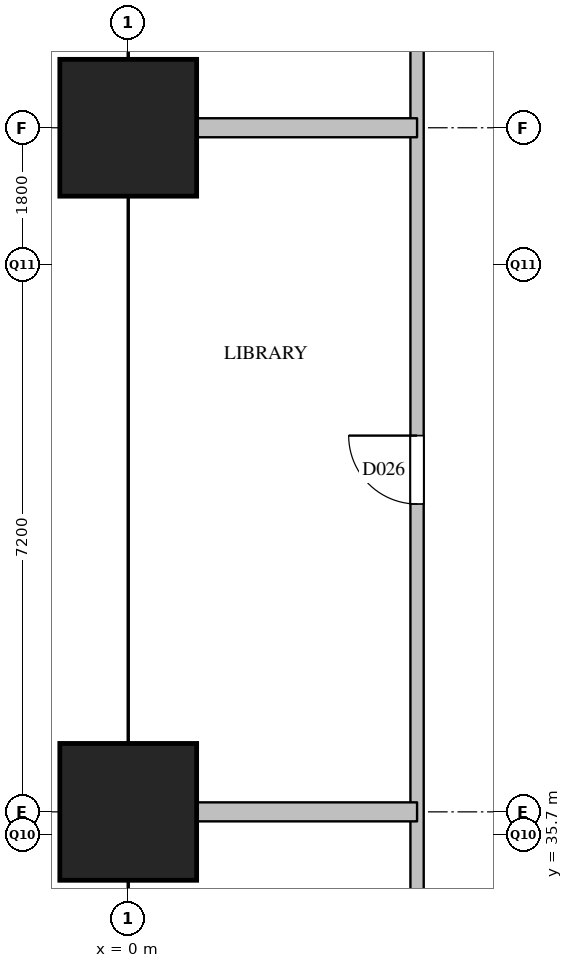
"""IFC4 building model, lengths in metres.
Left out: names, types, materials, properties, quantities, classifications, styles, units other than length and angle.
Written with IfcOpenShell. Run it as: python <this file> out.ifc"""

import sys

from ifc_helpers import new_model, si_unit, direction, frame, frame_2d, origin, origin_2d, place, context, subcontext, project, spatial, rectangle, extrude, element, fill, save


model = new_model("IFC4")
c1 = context("Model", 3, precision=1e-05, world=origin(), true_north=direction((0.0, 1.0)))
c2 = subcontext(c1, "Body", "Model", "MODEL_VIEW")
j1 = project(units=[si_unit("LENGTHUNIT", "METRE"), si_unit("PLANEANGLEUNIT", "RADIAN")], contexts=[c1])
p1 = place(None, origin())
s1 = spatial("IfcSite", under=j1, at=p1, CompositionType="ELEMENT")
p2 = place(p1, origin())
s2 = spatial("IfcBuilding", under=s1, at=p2, CompositionType="ELEMENT")
p3 = place(p2, frame((0.0, 0.0, 96.8)))
s3 = spatial("IfcBuildingStorey", under=s2, at=p3, CompositionType="ELEMENT", Elevation=96.8)
for number, where, z_axis, x_axis in (
    (1, (0.0, 36.0, 0.0), (0.0, 0.0, 1.0), (1.0, 0.0, 0.0)),
    (2, (0.0, 45.0, 0.0), (0.0, 0.0, 1.0), (1.0, 0.0, 0.0)),
):
    element("IfcColumn", number, at=place(p3, frame(where, z_axis=z_axis, x_axis=x_axis)), inside=s3, PredefinedType="COLUMN", context=c2, shape_type="SweptSolid", body=[
        extrude(rectangle(XDim=1.8, YDim=1.8, at=origin_2d()), origin(), (0.0, 0.0, 1.0), 3.8),
    ])
p4 = place(p3, frame((3.8, 28.5, 0.0), z_axis=(0.0, 0.0, 1.0), x_axis=(0.0, 1.0, 0.0)))
e3 = element("IfcWall", 3, at=p4, inside=s3, PredefinedType="PARTITIONING", context=c2, shape_type="SweptSolid", body=[
    extrude(rectangle(XDim=23.3, YDim=0.175, at=frame_2d((11.65, 0.0))), origin(), (0.0, 0.0, 1.0), 3.5),
])
p5 = place(p4, frame((3.3, 0.0, 0.0)))
e4 = element("IfcOpeningElement", 4, at=p5, cuts=e3, PredefinedType="OPENING", context=c2, shape_type="SweptSolid", body=[
    extrude(rectangle(XDim=0.9, YDim=2.1, at=frame_2d((0.45, 1.05))), frame((0.0, 0.097, 0.0), z_axis=(0.0, -1.0, 0.0), x_axis=(1.0, 0.0, 0.0)), (0.0, 0.0, 1.0), 0.195),
])
p6 = place(p4, frame((11.55, 0.0, 0.0)))
e5 = element("IfcOpeningElement", 5, at=p6, cuts=e3, PredefinedType="OPENING", context=c2, shape_type="SweptSolid", body=[
    extrude(rectangle(XDim=0.9, YDim=2.1, at=frame_2d((0.45, 1.05))), frame((0.0, 0.097, 0.0), z_axis=(0.0, -1.0, 0.0), x_axis=(1.0, 0.0, 0.0)), (0.0, 0.0, 1.0), 0.195),
])
p7 = place(p4, frame((19.45, 0.0, 0.0)))
e6 = element("IfcOpeningElement", 6, at=p7, cuts=e3, PredefinedType="OPENING", context=c2, shape_type="SweptSolid", body=[
    extrude(rectangle(XDim=0.9, YDim=2.1, at=frame_2d((0.45, 1.05))), frame((0.0, 0.097, 0.0), z_axis=(0.0, -1.0, 0.0), x_axis=(1.0, 0.0, 0.0)), (0.0, 0.0, 1.0), 0.195),
])
for number, where, z_axis, x_axis in (
    (7, (0.0, 36.0, 0.0), (0.0, 0.0, 1.0), (1.0, 0.0, 0.0)),
    (8, (0.0, 45.0, 0.0), (0.0, 0.0, 1.0), (1.0, 0.0, 0.0)),
):
    element("IfcWall", number, at=place(p3, frame(where, z_axis=z_axis, x_axis=x_axis)), inside=s3, PredefinedType="PARTITIONING", context=c2, shape_type="SweptSolid", body=[
        extrude(rectangle(XDim=3.8, YDim=0.25, at=frame_2d((1.9, 0.0))), origin(), (0.0, 0.0, 1.0), 3.5),
    ])
p8 = place(p6, origin())
e9 = element("IfcDoor", 9, at=p8, inside=s3, OperationType="SINGLE_SWING_RIGHT", PredefinedType="DOOR", context=c2, shape_type="SweptSolid", body=[
    extrude(rectangle(XDim=0.9, YDim=2.1, at=frame_2d((0.45, 1.05))), frame((0.0, 0.025, 0.0), z_axis=(0.0, -1.0, 0.0), x_axis=(1.0, 0.0, 0.0)), (0.0, 0.0, 1.0), 0.05),
])
fill(e5, e9)
save(model, sys.argv[1])
